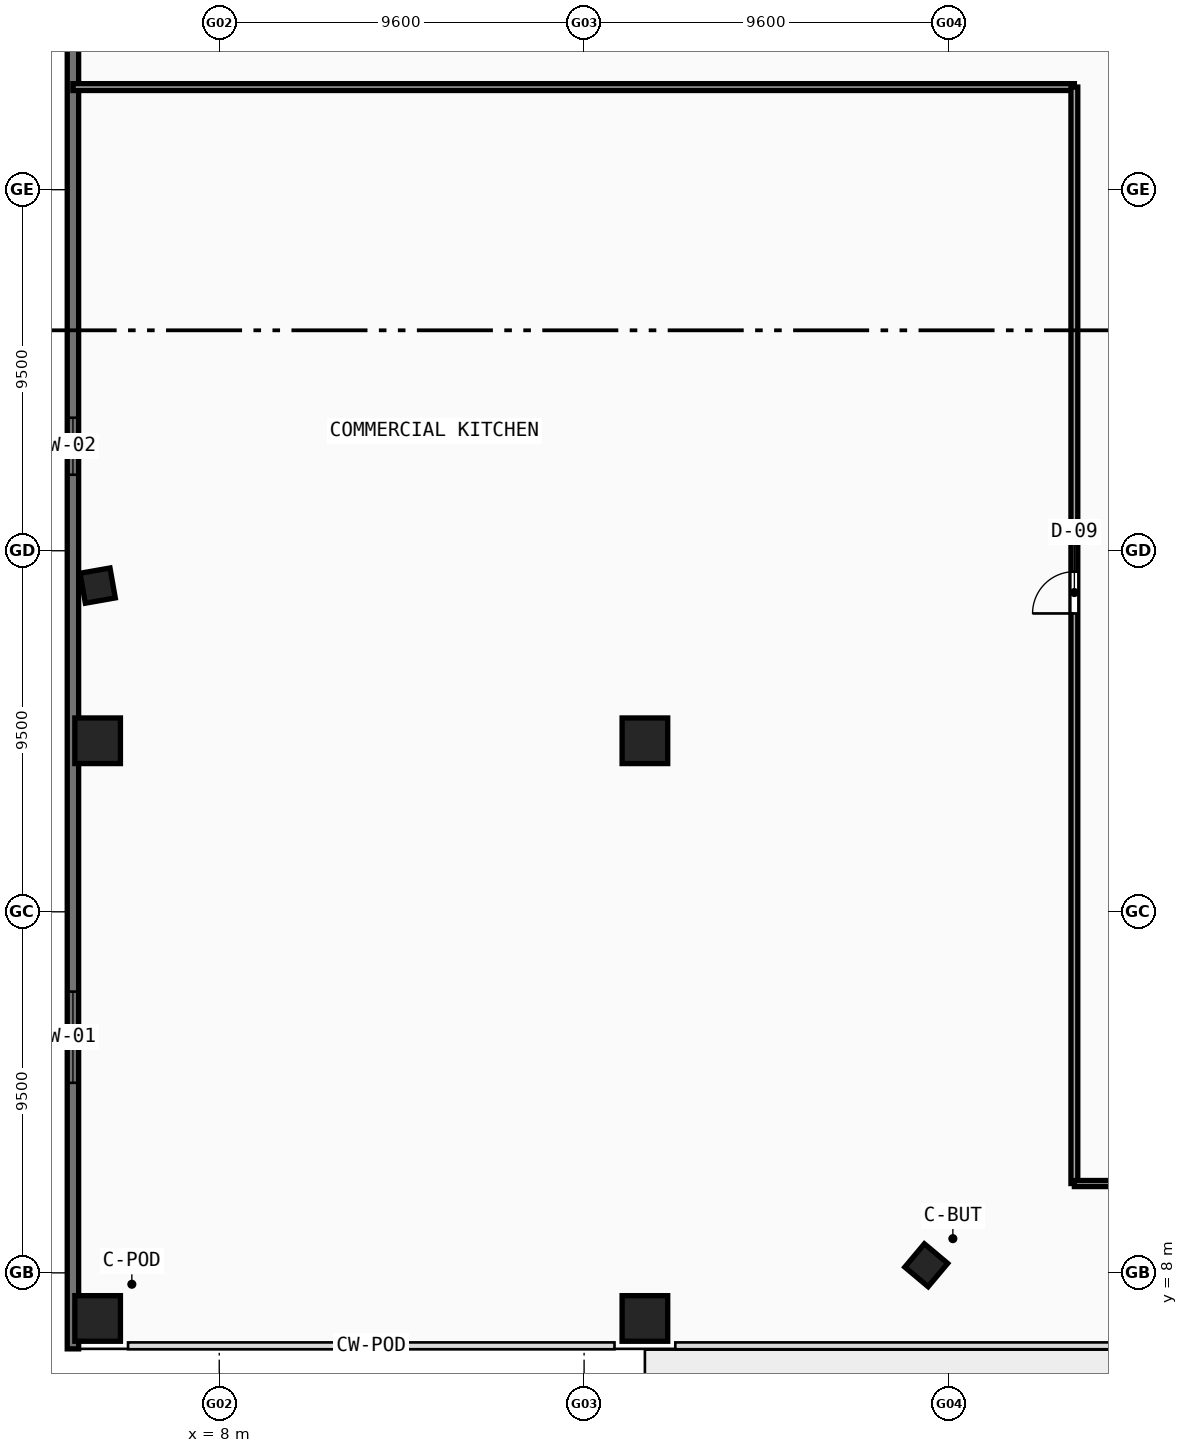
"""IFC4 building model, lengths in metres.
Left out: names, types, materials, properties, quantities, classifications, styles, units other than length and angle.
Written with IfcOpenShell. Run it as: python <this file> out.ifc"""

import sys

from ifc_helpers import new_model, si_unit, direction, frame, frame_2d, origin, origin_with_axes, origin_2d, place, context, subcontext, project, spatial, rectangle, hollow_rectangle, extrude, source, transform, mapped, element, fill, save


model = new_model("IFC4")
c1 = context("Model", 3, precision=1e-05, world=origin(), true_north=direction((0.0, 1.0)))
c2 = subcontext(c1, "Body", "Model", "MODEL_VIEW")
j1 = project(units=[si_unit("LENGTHUNIT", "METRE"), si_unit("PLANEANGLEUNIT", "RADIAN")], contexts=[c1])
p1 = place(None, origin())
s1 = spatial("IfcSite", under=j1, at=p1, CompositionType="ELEMENT")
p2 = place(p1, origin())
s2 = spatial("IfcBuilding", under=s1, at=p2, CompositionType="ELEMENT")
p3 = place(p2, frame((0.0, 0.0, 4.8)))
s3 = spatial("IfcBuildingStorey", under=s2, at=p3, CompositionType="ELEMENT", Elevation=4.8)
m1 = source(origin(), c2, "Body", "SweptSolid", [
    extrude(hollow_rectangle(XDim=1.2, YDim=1.2, WallThickness=0.05, at=origin_2d()), origin(), (0.0, 0.0, 1.0), 4.8),
])
for number, where, z_axis, x_axis in (
    (1, (4.8, 6.8, -0.28), (0.0, 0.0, 1.0), (1.0, 0.0, 0.0)),
    (2, (4.8, 22.0, -0.28), (0.0, 0.0, 1.0), (1.0, 0.0, 0.0)),
    (3, (19.2, 6.8, -0.28), (0.0, 0.0, 1.0), (1.0, 0.0, 0.0)),
    (4, (19.2, 22.0, -0.28), (0.0, 0.0, 1.0), (1.0, 0.0, 0.0)),
):
    element("IfcColumn", number, at=place(p3, frame(where, z_axis=z_axis, x_axis=x_axis)), inside=s3, PredefinedType="COLUMN", context=c2, shape_type="MappedRepresentation", body=[
        mapped(m1, transform((0.0, 0.0, 0.0), scale=1.0)),
    ])
m2 = source(origin(), c2, "Body", "SweptSolid", [
    extrude(hollow_rectangle(XDim=0.8, YDim=0.8, WallThickness=0.032, at=origin_2d()), origin(), (0.0, 0.0, 1.0), 4.8),
])
for number, where, z_axis, x_axis in (
    (5, (26.603, 8.2, -0.28), (0.0, 0.0, 1.0), (0.766, -0.643, 0.0)),
    (6, (4.801, 26.083, -0.28), (0.0, 0.0, 1.0), (0.174, -0.985, 0.0)),
):
    element("IfcColumn", number, at=place(p3, frame(where, z_axis=z_axis, x_axis=x_axis)), inside=s3, PredefinedType="COLUMN", context=c2, shape_type="MappedRepresentation", body=[
        mapped(m2, transform((0.0, 0.0, 0.0), scale=1.0)),
    ])
p4 = place(p3, frame((4.15, 6.0, 0.0), z_axis=(0.0, 0.0, 1.0), x_axis=(0.0, 1.0, 0.0)))
e7 = element("IfcWall", 7, at=p4, inside=s3, PredefinedType="STANDARD", context=c2, shape_type="SweptSolid", body=[
    extrude(rectangle(XDim=84.0, YDim=0.3, at=frame_2d((42.0, 0.0))), origin(), (0.0, 0.0, 1.0), 4.52),
])
p5 = place(p4, frame((7.0, 0.0, 0.9)))
e8 = element("IfcOpeningElement", 8, at=p5, cuts=e7, PredefinedType="OPENING", context=c2, shape_type="SweptSolid", body=[
    extrude(rectangle(XDim=2.4, YDim=1.8, at=frame_2d((1.2, 0.9))), frame((0.0, 0.16, 0.0), z_axis=(0.0, -1.0, 0.0), x_axis=(1.0, 0.0, 0.0)), (0.0, 0.0, 1.0), 0.32),
])
p6 = place(p4, frame((23.0, 0.0, 0.9)))
e9 = element("IfcOpeningElement", 9, at=p6, cuts=e7, PredefinedType="OPENING", context=c2, shape_type="SweptSolid", body=[
    extrude(rectangle(XDim=1.5, YDim=1.6, at=frame_2d((0.75, 0.8))), frame((0.0, 0.16, 0.0), z_axis=(0.0, -1.0, 0.0), x_axis=(1.0, 0.0, 0.0)), (0.0, 0.0, 1.0), 0.32),
])
p7 = place(p4, frame((43.0, 0.0, 0.9)))
e10 = element("IfcOpeningElement", 10, at=p7, cuts=e7, PredefinedType="OPENING", context=c2, shape_type="SweptSolid", body=[
    extrude(rectangle(XDim=2.4, YDim=1.8, at=frame_2d((1.2, 0.9))), frame((0.0, 0.16, 0.0), z_axis=(0.0, -1.0, 0.0), x_axis=(1.0, 0.0, 0.0)), (0.0, 0.0, 1.0), 0.32),
])
p8 = place(p4, frame((63.0, 0.0, 0.9)))
e11 = element("IfcOpeningElement", 11, at=p8, cuts=e7, PredefinedType="OPENING", context=c2, shape_type="SweptSolid", body=[
    extrude(rectangle(XDim=1.5, YDim=1.6, at=frame_2d((0.75, 0.8))), frame((0.0, 0.16, 0.0), z_axis=(0.0, -1.0, 0.0), x_axis=(1.0, 0.0, 0.0)), (0.0, 0.0, 1.0), 0.32),
])
p9 = place(p3, frame((4.15, 39.2, 0.0), z_axis=(0.0, 0.0, 1.0), x_axis=(1.0, 0.0, 0.0)))
e12 = element("IfcWall", 12, at=p9, inside=s3, PredefinedType="PARTITIONING", context=c2, shape_type="SweptSolid", body=[
    extrude(rectangle(XDim=26.35, YDim=0.18, at=frame_2d((13.175, 0.0))), origin(), (0.0, 0.0, 1.0), 3.62),
])
p10 = place(p3, frame((30.5, 10.35, 0.0), z_axis=(0.0, 0.0, 1.0), x_axis=(0.0, 1.0, 0.0)))
e13 = element("IfcWall", 13, at=p10, inside=s3, PredefinedType="PARTITIONING", context=c2, shape_type="SweptSolid", body=[
    extrude(rectangle(XDim=28.85, YDim=0.18, at=frame_2d((14.425, 0.0))), origin(), (0.0, 0.0, 1.0), 3.62),
])
p11 = place(p10, frame((15.0, 0.0, 0.0)))
e14 = element("IfcOpeningElement", 14, at=p11, cuts=e13, PredefinedType="OPENING", context=c2, shape_type="SweptSolid", body=[
    extrude(rectangle(XDim=1.1, YDim=2.15, at=frame_2d((0.55, 1.075))), frame((0.0, 0.1, 0.0), z_axis=(0.0, -1.0, 0.0), x_axis=(1.0, 0.0, 0.0)), (0.0, 0.0, 1.0), 0.2),
])
p12 = place(p3, frame((30.5, 10.35, 0.0), z_axis=(0.0, 0.0, 1.0), x_axis=(1.0, 0.0, 0.0)))
e15 = element("IfcWall", 15, at=p12, inside=s3, PredefinedType="PARTITIONING", context=c2, shape_type="SweptSolid", body=[
    extrude(rectangle(XDim=35.0, YDim=0.16, at=frame_2d((17.5, 0.0))), origin(), (0.0, 0.0, 1.0), 3.62),
])
m3 = source(origin(), c2, "Body", "SweptSolid", [
    extrude(rectangle(XDim=2.4, YDim=1.8, at=frame_2d((1.2, 0.9))), frame((0.0, 0.03, 0.0), z_axis=(0.0, -1.0, 0.0), x_axis=(1.0, 0.0, 0.0)), (0.0, 0.0, 1.0), 0.06),
])
p13 = place(p5, origin_with_axes())
e16 = element("IfcWindow", 16, at=p13, inside=s3, PartitioningType="SINGLE_PANEL", PredefinedType="WINDOW", context=c2, shape_type="MappedRepresentation", body=[
    mapped(m3, transform((0.0, 0.0, 0.0), scale=1.0)),
])
fill(e8, e16)
m4 = source(origin(), c2, "Body", "SweptSolid", [
    extrude(rectangle(XDim=1.5, YDim=1.6, at=frame_2d((0.75, 0.8))), frame((0.0, 0.03, 0.0), z_axis=(0.0, -1.0, 0.0), x_axis=(1.0, 0.0, 0.0)), (0.0, 0.0, 1.0), 0.06),
])
p14 = place(p6, origin_with_axes())
e17 = element("IfcWindow", 17, at=p14, inside=s3, PartitioningType="SINGLE_PANEL", PredefinedType="WINDOW", context=c2, shape_type="MappedRepresentation", body=[
    mapped(m4, transform((0.0, 0.0, 0.0), scale=1.0)),
])
fill(e9, e17)
m5 = source(origin(), c2, "Body", "SweptSolid", [
    extrude(rectangle(XDim=1.1, YDim=2.15, at=frame_2d((0.55, 1.075))), frame((0.0, 0.025, 0.0), z_axis=(0.0, -1.0, 0.0), x_axis=(1.0, 0.0, 0.0)), (0.0, 0.0, 1.0), 0.05),
])
p15 = place(p11, origin_with_axes())
e18 = element("IfcDoor", 18, at=p15, inside=s3, OperationType="SINGLE_SWING_LEFT", PredefinedType="DOOR", context=c2, shape_type="MappedRepresentation", body=[
    mapped(m5, transform((0.0, 0.0, 0.0), scale=1.0)),
])
fill(e14, e18)
save(model, sys.argv[1])
